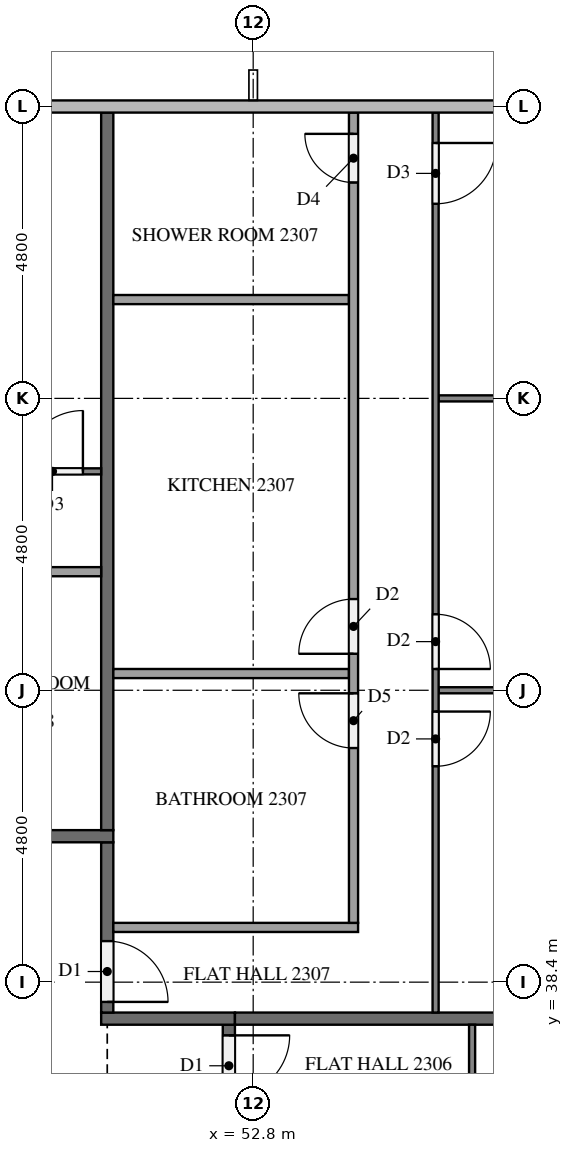
"""IFC4 building model, lengths in metres.
Left out: names, types, materials, properties, quantities, classifications, styles, units other than length and angle.
Written with IfcOpenShell. Run it as: python <this file> out.ifc"""

import sys

from ifc_helpers import new_model, si_unit, direction, frame, frame_2d, origin, place, context, subcontext, project, spatial, rectangle, extrude, element, fill, save


model = new_model("IFC4")
c1 = context("Model", 3, precision=1e-05, world=origin(), true_north=direction((0.0, 1.0)))
c2 = subcontext(c1, "Body", "Model", "MODEL_VIEW")
j1 = project(units=[si_unit("LENGTHUNIT", "METRE"), si_unit("PLANEANGLEUNIT", "RADIAN")], contexts=[c1])
p1 = place(None, origin())
s1 = spatial("IfcSite", under=j1, at=p1, CompositionType="ELEMENT")
p2 = place(p1, origin())
s2 = spatial("IfcBuilding", under=s1, at=p2, CompositionType="ELEMENT")
p3 = place(p2, frame((0.0, 0.0, 92.7)))
s3 = spatial("IfcBuildingStorey", under=s2, at=p3, CompositionType="ELEMENT", Elevation=92.7)
p4 = place(p3, frame((52.4, 37.7, 0.0), z_axis=(0.0, 0.0, 1.0), x_axis=(0.0, -1.0, 0.0)))
e1 = element("IfcWall", 1, at=p4, inside=s3, PredefinedType="PARTITIONING", context=c2, shape_type="SweptSolid", body=[
    extrude(rectangle(XDim=22.6, YDim=0.2, at=frame_2d((11.3, 0.0))), origin(), (0.0, 0.0, 1.0), 3.2),
])
p5 = place(p4, frame((21.425, 0.0, 0.0)))
e2 = element("IfcOpeningElement", 2, at=p5, cuts=e1, PredefinedType="OPENING", context=c2, shape_type="SweptSolid", body=[
    extrude(rectangle(XDim=1.0, YDim=2.1, at=frame_2d((0.5, 1.05))), frame((0.0, 0.11, 0.0), z_axis=(0.0, -1.0, 0.0), x_axis=(1.0, 0.0, 0.0)), (0.0, 0.0, 1.0), 0.22),
])
p6 = place(p4, frame((0.175, 0.0, 0.0)))
e3 = element("IfcOpeningElement", 3, at=p6, cuts=e1, PredefinedType="OPENING", context=c2, shape_type="SweptSolid", body=[
    extrude(rectangle(XDim=1.0, YDim=2.1, at=frame_2d((0.5, 1.05))), frame((0.0, 0.11, 0.0), z_axis=(0.0, -1.0, 0.0), x_axis=(1.0, 0.0, 0.0)), (0.0, 0.0, 1.0), 0.22),
])
p7 = place(p3, frame((52.5, 37.8, 0.0), z_axis=(0.0, 0.0, 1.0), x_axis=(-1.0, 0.0, 0.0)))
e4 = element("IfcWall", 4, at=p7, inside=s3, PredefinedType="PARTITIONING", context=c2, shape_type="SweptSolid", body=[
    extrude(rectangle(XDim=2.2, YDim=0.2, at=frame_2d((1.1, 0.0))), origin(), (0.0, 0.0, 1.0), 3.2),
])
p8 = place(p3, frame((50.4, 40.7, 0.0), z_axis=(0.0, 0.0, 1.0), x_axis=(0.0, -1.0, 0.0)))
e5 = element("IfcWall", 5, at=p8, inside=s3, PredefinedType="PARTITIONING", context=c2, shape_type="SweptSolid", body=[
    extrude(rectangle(XDim=2.8, YDim=0.2, at=frame_2d((1.4, 0.0))), origin(), (0.0, 0.0, 1.0), 3.2),
])
p9 = place(p8, frame((1.625, 0.0, 0.0)))
e6 = element("IfcOpeningElement", 6, at=p9, cuts=e5, PredefinedType="OPENING", context=c2, shape_type="SweptSolid", body=[
    extrude(rectangle(XDim=1.0, YDim=2.1, at=frame_2d((0.5, 1.05))), frame((0.0, 0.11, 0.0), z_axis=(0.0, -1.0, 0.0), x_axis=(1.0, 0.0, 0.0)), (0.0, 0.0, 1.0), 0.22),
])
p10 = place(p3, frame((11.9, 40.8, 0.0), z_axis=(0.0, 0.0, 1.0), x_axis=(1.0, 0.0, 0.0)))
e7 = element("IfcWall", 7, at=p10, inside=s3, PredefinedType="PARTITIONING", context=c2, shape_type="SweptSolid", body=[
    extrude(rectangle(XDim=38.6, YDim=0.2, at=frame_2d((19.3, 0.0))), origin(), (0.0, 0.0, 1.0), 3.2),
])
p11 = place(p10, frame((31.575, 0.0, 0.0)))
e8 = element("IfcOpeningElement", 8, at=p11, cuts=e7, PredefinedType="OPENING", context=c2, shape_type="SweptSolid", body=[
    extrude(rectangle(XDim=1.0, YDim=2.1, at=frame_2d((0.5, 1.05))), frame((0.0, 0.11, 0.0), z_axis=(0.0, -1.0, 0.0), x_axis=(1.0, 0.0, 0.0)), (0.0, 0.0, 1.0), 0.22),
])
p12 = place(p10, frame((14.775, 0.0, 0.0)))
e9 = element("IfcOpeningElement", 9, at=p12, cuts=e7, PredefinedType="OPENING", context=c2, shape_type="SweptSolid", body=[
    extrude(rectangle(XDim=1.0, YDim=2.1, at=frame_2d((0.5, 1.05))), frame((0.0, 0.11, 0.0), z_axis=(0.0, -1.0, 0.0), x_axis=(1.0, 0.0, 0.0)), (0.0, 0.0, 1.0), 0.22),
])
p13 = place(p10, frame((0.375, 0.0, 0.0)))
e10 = element("IfcOpeningElement", 10, at=p13, cuts=e7, PredefinedType="OPENING", context=c2, shape_type="SweptSolid", body=[
    extrude(rectangle(XDim=1.0, YDim=2.1, at=frame_2d((0.5, 1.05))), frame((0.0, 0.11, 0.0), z_axis=(0.0, -1.0, 0.0), x_axis=(1.0, 0.0, 0.0)), (0.0, 0.0, 1.0), 0.22),
])
p14 = place(p3, frame((52.5, 37.8, 0.0), z_axis=(0.0, 0.0, 1.0), x_axis=(1.0, 0.0, 0.0)))
e11 = element("IfcWall", 11, at=p14, inside=s3, PredefinedType="PARTITIONING", context=c2, shape_type="SweptSolid", body=[
    extrude(rectangle(XDim=9.475, YDim=0.2, at=frame_2d((4.738, 0.0))), origin(), (0.0, 0.0, 1.0), 3.2),
])
p15 = place(p3, frame((50.4, 40.9, 0.0), z_axis=(0.0, 0.0, 1.0), x_axis=(0.0, 1.0, 0.0)))
e12 = element("IfcWall", 12, at=p15, inside=s3, PredefinedType="PARTITIONING", context=c2, shape_type="SweptSolid", body=[
    extrude(rectangle(XDim=11.8, YDim=0.2, at=frame_2d((5.9, 0.0))), origin(), (0.0, 0.0, 1.0), 3.2),
])
p16 = place(p3, frame((56.4, 37.7, 0.0), z_axis=(0.0, 0.0, 1.0), x_axis=(0.0, -1.0, 0.0)))
e13 = element("IfcWall", 13, at=p16, inside=s3, PredefinedType="PARTITIONING", context=c2, shape_type="SweptSolid", body=[
    extrude(rectangle(XDim=8.8, YDim=0.1, at=frame_2d((4.4, 0.0))), origin(), (0.0, 0.0, 1.0), 3.2),
])
p17 = place(p16, frame((2.75, 0.0, 0.0)))
e14 = element("IfcOpeningElement", 14, at=p17, cuts=e13, PredefinedType="OPENING", context=c2, shape_type="SweptSolid", body=[
    extrude(rectangle(XDim=1.0, YDim=2.1, at=frame_2d((0.5, 1.05))), frame((0.0, 0.06, 0.0), z_axis=(0.0, -1.0, 0.0), x_axis=(1.0, 0.0, 0.0)), (0.0, 0.0, 1.0), 0.12),
])
p18 = place(p16, frame((4.45, 0.0, 0.0)))
e15 = element("IfcOpeningElement", 15, at=p18, cuts=e13, PredefinedType="OPENING", context=c2, shape_type="SweptSolid", body=[
    extrude(rectangle(XDim=0.9, YDim=2.1, at=frame_2d((0.45, 1.05))), frame((0.0, 0.06, 0.0), z_axis=(0.0, -1.0, 0.0), x_axis=(1.0, 0.0, 0.0)), (0.0, 0.0, 1.0), 0.12),
])
p19 = place(p3, frame((55.85, 43.2, 0.0), z_axis=(0.0, 0.0, 1.0), x_axis=(1.0, 0.0, 0.0)))
e16 = element("IfcWall", 16, at=p19, inside=s3, PredefinedType="PARTITIONING", context=c2, shape_type="SweptSolid", body=[
    extrude(rectangle(XDim=6.45, YDim=0.1, at=frame_2d((3.225, 0.0))), origin(), (0.0, 0.0, 1.0), 3.2),
])
p20 = place(p3, frame((55.85, 48.0, 0.0), z_axis=(0.0, 0.0, 1.0), x_axis=(1.0, 0.0, 0.0)))
e17 = element("IfcWall", 17, at=p20, inside=s3, PredefinedType="PARTITIONING", context=c2, shape_type="SweptSolid", body=[
    extrude(rectangle(XDim=5.975, YDim=0.1, at=frame_2d((2.987, 0.0))), origin(), (0.0, 0.0, 1.0), 3.2),
])
p21 = place(p3, frame((55.8, 52.7, 0.0), z_axis=(0.0, 0.0, 1.0), x_axis=(0.0, -1.0, 0.0)))
e18 = element("IfcWall", 18, at=p21, inside=s3, PredefinedType="PARTITIONING", context=c2, shape_type="SweptSolid", body=[
    extrude(rectangle(XDim=14.8, YDim=0.1, at=frame_2d((7.4, 0.0))), origin(), (0.0, 0.0, 1.0), 3.2),
])
p22 = place(p21, frame((9.85, 0.0, 0.0)))
e19 = element("IfcOpeningElement", 19, at=p22, cuts=e18, PredefinedType="OPENING", context=c2, shape_type="SweptSolid", body=[
    extrude(rectangle(XDim=0.9, YDim=2.1, at=frame_2d((0.45, 1.05))), frame((0.0, 0.06, 0.0), z_axis=(0.0, -1.0, 0.0), x_axis=(1.0, 0.0, 0.0)), (0.0, 0.0, 1.0), 0.12),
])
p23 = place(p21, frame((8.25, 0.0, 0.0)))
e20 = element("IfcOpeningElement", 20, at=p23, cuts=e18, PredefinedType="OPENING", context=c2, shape_type="SweptSolid", body=[
    extrude(rectangle(XDim=0.9, YDim=2.1, at=frame_2d((0.45, 1.05))), frame((0.0, 0.06, 0.0), z_axis=(0.0, -1.0, 0.0), x_axis=(1.0, 0.0, 0.0)), (0.0, 0.0, 1.0), 0.12),
])
p24 = place(p21, frame((0.5, 0.0, 0.0)))
e21 = element("IfcOpeningElement", 21, at=p24, cuts=e18, PredefinedType="OPENING", context=c2, shape_type="SweptSolid", body=[
    extrude(rectangle(XDim=1.0, YDim=2.1, at=frame_2d((0.5, 1.05))), frame((0.0, 0.06, 0.0), z_axis=(0.0, -1.0, 0.0), x_axis=(1.0, 0.0, 0.0)), (0.0, 0.0, 1.0), 0.12),
])
for number, where, z_axis, x_axis in (
    (22, (50.5, 43.475, 0.0), (0.0, 0.0, 1.0), (1.0, 0.0, 0.0)),
    (23, (50.5, 49.625, 0.0), (0.0, 0.0, 1.0), (1.0, 0.0, 0.0)),
):
    element("IfcWall", number, at=place(p3, frame(where, z_axis=z_axis, x_axis=x_axis)), inside=s3, PredefinedType="PARTITIONING", context=c2, shape_type="SweptSolid", body=[
        extrude(rectangle(XDim=3.875, YDim=0.15, at=frame_2d((1.938, 0.0))), origin(), (0.0, 0.0, 1.0), 3.2),
    ])
p25 = place(p3, frame((50.5, 39.3, 0.0), z_axis=(0.0, 0.0, 1.0), x_axis=(1.0, 0.0, 0.0)))
e24 = element("IfcWall", 24, at=p25, inside=s3, PredefinedType="PARTITIONING", context=c2, shape_type="SweptSolid", body=[
    extrude(rectangle(XDim=4.025, YDim=0.15, at=frame_2d((2.012, 0.0))), origin(), (0.0, 0.0, 1.0), 3.2),
])
p26 = place(p3, frame((54.45, 39.375, 0.0), z_axis=(0.0, 0.0, 1.0), x_axis=(0.0, 1.0, 0.0)))
e25 = element("IfcWall", 25, at=p26, inside=s3, PredefinedType="PARTITIONING", context=c2, shape_type="SweptSolid", body=[
    extrude(rectangle(XDim=13.325, YDim=0.15, at=frame_2d((6.663, 0.0))), origin(), (0.0, 0.0, 1.0), 3.2),
])
p27 = place(p26, frame((2.875, 0.0, 0.0)))
e26 = element("IfcOpeningElement", 26, at=p27, cuts=e25, PredefinedType="OPENING", context=c2, shape_type="SweptSolid", body=[
    extrude(rectangle(XDim=0.9, YDim=2.1, at=frame_2d((0.45, 1.05))), frame((0.0, 0.085, 0.0), z_axis=(0.0, -1.0, 0.0), x_axis=(1.0, 0.0, 0.0)), (0.0, 0.0, 1.0), 0.17),
])
p28 = place(p26, frame((4.425, 0.0, 0.0)))
e27 = element("IfcOpeningElement", 27, at=p28, cuts=e25, PredefinedType="OPENING", context=c2, shape_type="SweptSolid", body=[
    extrude(rectangle(XDim=0.9, YDim=2.1, at=frame_2d((0.45, 1.05))), frame((0.0, 0.085, 0.0), z_axis=(0.0, -1.0, 0.0), x_axis=(1.0, 0.0, 0.0)), (0.0, 0.0, 1.0), 0.17),
])
p29 = place(p26, frame((12.175, 0.0, 0.0)))
e28 = element("IfcOpeningElement", 28, at=p29, cuts=e25, PredefinedType="OPENING", context=c2, shape_type="SweptSolid", body=[
    extrude(rectangle(XDim=0.8, YDim=2.1, at=frame_2d((0.4, 1.05))), frame((0.0, 0.085, 0.0), z_axis=(0.0, -1.0, 0.0), x_axis=(1.0, 0.0, 0.0)), (0.0, 0.0, 1.0), 0.17),
])
p30 = place(p3, frame((43.3, 46.8, 0.0), z_axis=(0.0, 0.0, 1.0), x_axis=(1.0, 0.0, 0.0)))
e29 = element("IfcWall", 29, at=p30, inside=s3, PredefinedType="PARTITIONING", context=c2, shape_type="SweptSolid", body=[
    extrude(rectangle(XDim=7.0, YDim=0.1, at=frame_2d((3.5, 0.0))), origin(), (0.0, 0.0, 1.0), 3.2),
])
p31 = place(p30, frame((5.7, 0.0, 0.0)))
e30 = element("IfcOpeningElement", 30, at=p31, cuts=e29, PredefinedType="OPENING", context=c2, shape_type="SweptSolid", body=[
    extrude(rectangle(XDim=1.0, YDim=2.1, at=frame_2d((0.5, 1.05))), frame((0.0, 0.06, 0.0), z_axis=(0.0, -1.0, 0.0), x_axis=(1.0, 0.0, 0.0)), (0.0, 0.0, 1.0), 0.12),
])
p32 = place(p3, frame((50.3, 45.15, 0.0), z_axis=(0.0, 0.0, 1.0), x_axis=(-1.0, 0.0, 0.0)))
e31 = element("IfcWall", 31, at=p32, inside=s3, PredefinedType="PARTITIONING", context=c2, shape_type="SweptSolid", body=[
    extrude(rectangle(XDim=5.525, YDim=0.15, at=frame_2d((2.763, 0.0))), origin(), (0.0, 0.0, 1.0), 3.2),
])
p33 = place(p32, frame((2.535, 0.0, 0.0)))
e32 = element("IfcOpeningElement", 32, at=p33, cuts=e31, PredefinedType="OPENING", context=c2, shape_type="SweptSolid", body=[
    extrude(rectangle(XDim=0.9, YDim=2.1, at=frame_2d((0.45, 1.05))), frame((0.0, 0.085, 0.0), z_axis=(0.0, -1.0, 0.0), x_axis=(1.0, 0.0, 0.0)), (0.0, 0.0, 1.0), 0.17),
])
p34 = place(p32, frame((1.085, 0.0, 0.0)))
e33 = element("IfcOpeningElement", 33, at=p34, cuts=e31, PredefinedType="OPENING", context=c2, shape_type="SweptSolid", body=[
    extrude(rectangle(XDim=0.8, YDim=2.1, at=frame_2d((0.4, 1.05))), frame((0.0, 0.085, 0.0), z_axis=(0.0, -1.0, 0.0), x_axis=(1.0, 0.0, 0.0)), (0.0, 0.0, 1.0), 0.17),
])
p35 = place(p6, origin())
e34 = element("IfcDoor", 34, at=p35, inside=s3, OperationType="SINGLE_SWING_LEFT", PredefinedType="DOOR", context=c2, shape_type="SweptSolid", body=[
    extrude(rectangle(XDim=1.0, YDim=2.1, at=frame_2d((0.5, 1.05))), frame((0.0, 0.025, 0.0), z_axis=(0.0, -1.0, 0.0), x_axis=(1.0, 0.0, 0.0)), (0.0, 0.0, 1.0), 0.05),
])
fill(e3, e34)
p36 = place(p9, origin())
e35 = element("IfcDoor", 35, at=p36, inside=s3, OperationType="SINGLE_SWING_RIGHT", PredefinedType="DOOR", context=c2, shape_type="SweptSolid", body=[
    extrude(rectangle(XDim=1.0, YDim=2.1, at=frame_2d((0.5, 1.05))), frame((0.0, 0.025, 0.0), z_axis=(0.0, -1.0, 0.0), x_axis=(1.0, 0.0, 0.0)), (0.0, 0.0, 1.0), 0.05),
])
fill(e6, e35)
p37 = place(p22, origin())
e36 = element("IfcDoor", 36, at=p37, inside=s3, OperationType="SINGLE_SWING_LEFT", PredefinedType="DOOR", context=c2, shape_type="SweptSolid", body=[
    extrude(rectangle(XDim=0.9, YDim=2.1, at=frame_2d((0.45, 1.05))), frame((0.0, 0.025, 0.0), z_axis=(0.0, -1.0, 0.0), x_axis=(1.0, 0.0, 0.0)), (0.0, 0.0, 1.0), 0.05),
])
fill(e19, e36)
p38 = place(p23, origin())
e37 = element("IfcDoor", 37, at=p38, inside=s3, OperationType="SINGLE_SWING_RIGHT", PredefinedType="DOOR", context=c2, shape_type="SweptSolid", body=[
    extrude(rectangle(XDim=0.9, YDim=2.1, at=frame_2d((0.45, 1.05))), frame((0.0, 0.025, 0.0), z_axis=(0.0, -1.0, 0.0), x_axis=(1.0, 0.0, 0.0)), (0.0, 0.0, 1.0), 0.05),
])
fill(e20, e37)
p39 = place(p24, origin())
e38 = element("IfcDoor", 38, at=p39, inside=s3, OperationType="SINGLE_SWING_LEFT", PredefinedType="DOOR", context=c2, shape_type="SweptSolid", body=[
    extrude(rectangle(XDim=1.0, YDim=2.1, at=frame_2d((0.5, 1.05))), frame((0.0, 0.025, 0.0), z_axis=(0.0, -1.0, 0.0), x_axis=(1.0, 0.0, 0.0)), (0.0, 0.0, 1.0), 0.05),
])
fill(e21, e38)
p40 = place(p27, origin())
e39 = element("IfcDoor", 39, at=p40, inside=s3, OperationType="SINGLE_SWING_RIGHT", PredefinedType="DOOR", context=c2, shape_type="SweptSolid", body=[
    extrude(rectangle(XDim=0.9, YDim=2.1, at=frame_2d((0.45, 1.05))), frame((0.0, 0.025, 0.0), z_axis=(0.0, -1.0, 0.0), x_axis=(1.0, 0.0, 0.0)), (0.0, 0.0, 1.0), 0.05),
])
fill(e26, e39)
p41 = place(p28, origin())
e40 = element("IfcDoor", 40, at=p41, inside=s3, OperationType="SINGLE_SWING_LEFT", PredefinedType="DOOR", context=c2, shape_type="SweptSolid", body=[
    extrude(rectangle(XDim=0.9, YDim=2.1, at=frame_2d((0.45, 1.05))), frame((0.0, 0.025, 0.0), z_axis=(0.0, -1.0, 0.0), x_axis=(1.0, 0.0, 0.0)), (0.0, 0.0, 1.0), 0.05),
])
fill(e27, e40)
p42 = place(p29, origin())
e41 = element("IfcDoor", 41, at=p42, inside=s3, OperationType="SINGLE_SWING_RIGHT", PredefinedType="DOOR", context=c2, shape_type="SweptSolid", body=[
    extrude(rectangle(XDim=0.8, YDim=2.1, at=frame_2d((0.4, 1.05))), frame((0.0, 0.025, 0.0), z_axis=(0.0, -1.0, 0.0), x_axis=(1.0, 0.0, 0.0)), (0.0, 0.0, 1.0), 0.05),
])
fill(e28, e41)
p43 = place(p31, origin())
e42 = element("IfcDoor", 42, at=p43, inside=s3, OperationType="SINGLE_SWING_RIGHT", PredefinedType="DOOR", context=c2, shape_type="SweptSolid", body=[
    extrude(rectangle(XDim=1.0, YDim=2.1, at=frame_2d((0.5, 1.05))), frame((0.0, 0.025, 0.0), z_axis=(0.0, -1.0, 0.0), x_axis=(1.0, 0.0, 0.0)), (0.0, 0.0, 1.0), 0.05),
])
fill(e30, e42)
save(model, sys.argv[1])
